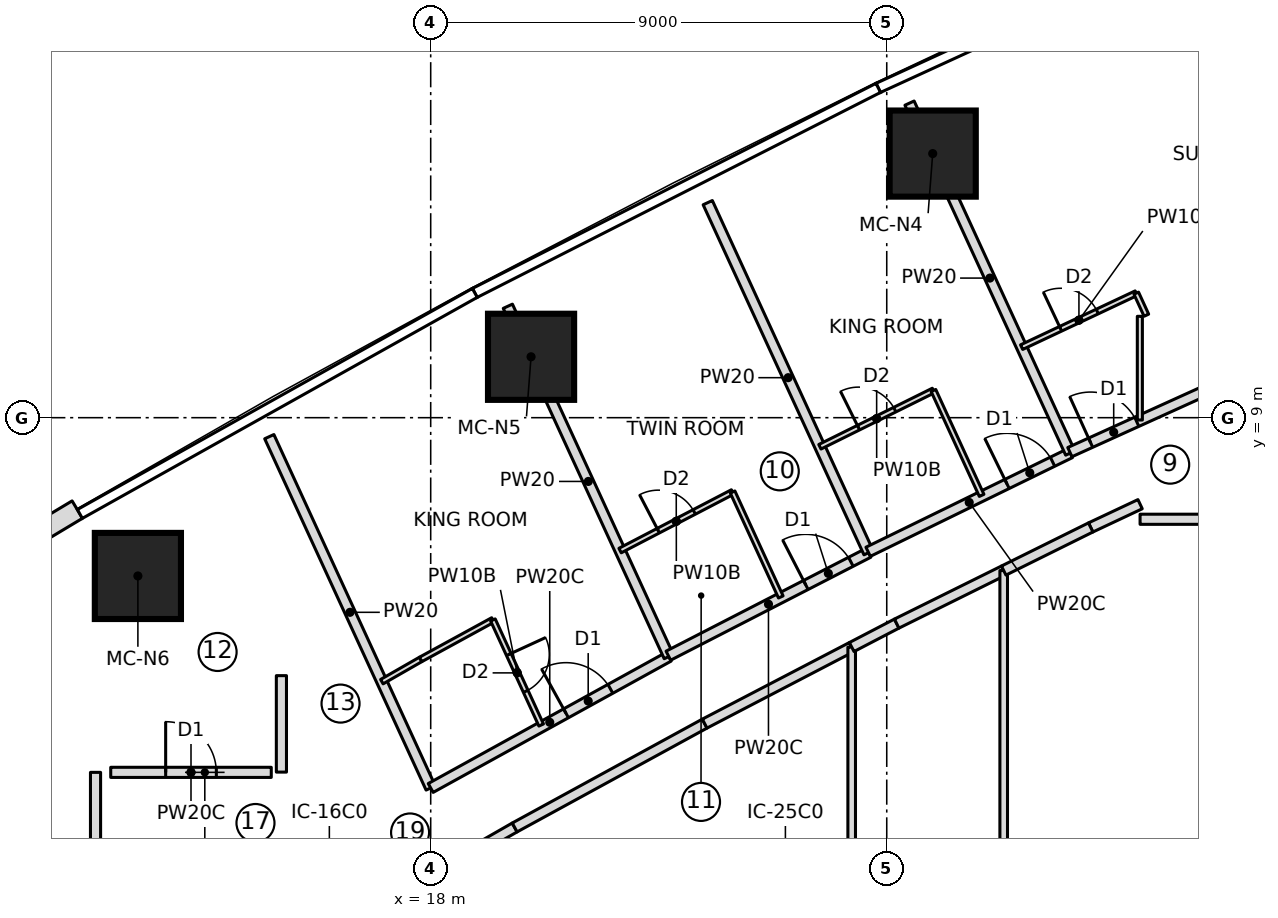
"""IFC4 building model, lengths in metres.
Left out: names, types, materials, properties, quantities, classifications, styles, units other than length and angle.
Written with IfcOpenShell. Run it as: python <this file> out.ifc"""

import sys

from ifc_helpers import new_model, si_unit, direction, frame, frame_2d, origin, origin_2d, place, context, subcontext, project, spatial, polyline, rectangle, outline, extrude, element, fill, save


model = new_model("IFC4")
c1 = context("Model", 3, precision=1e-05, world=origin(), true_north=direction((0.0, 1.0)))
c2 = subcontext(c1, "Body", "Model", "MODEL_VIEW")
j1 = project(units=[si_unit("LENGTHUNIT", "METRE"), si_unit("PLANEANGLEUNIT", "RADIAN")], contexts=[c1])
p1 = place(None, origin())
s1 = spatial("IfcSite", under=j1, at=p1, CompositionType="ELEMENT")
p2 = place(p1, origin())
s2 = spatial("IfcBuilding", under=s1, at=p2, CompositionType="ELEMENT")
p3 = place(p2, frame((0.0, 0.0, 113.3)))
s3 = spatial("IfcBuildingStorey", under=s2, at=p3, CompositionType="ELEMENT", Elevation=113.3)
for number, where, z_axis, x_axis in (
    (1, (27.907, 14.212, 0.0), (0.0, 0.0, 1.0), (1.0, 0.0, 0.0)),
    (2, (19.981, 10.202, 0.0), (0.0, 0.0, 1.0), (1.0, 0.0, 0.0)),
    (3, (12.221, 5.876, 0.0), (0.0, 0.0, 1.0), (1.0, 0.0, 0.0)),
):
    element("IfcColumn", number, at=place(p3, frame(where, z_axis=z_axis, x_axis=x_axis)), inside=s3, PredefinedType="COLUMN", context=c2, shape_type="SweptSolid", body=[
        extrude(rectangle(XDim=1.7, YDim=1.7, at=origin_2d()), origin(), (0.0, 0.0, 1.0), 3.55),
    ])
p4 = place(p3, frame((11.026, 7.186, 0.0), z_axis=(0.0, 0.0, 1.0), x_axis=(-0.857550776474, -0.514399325202, 0.0)))
e4 = element("IfcWall", 4, at=p4, inside=s3, PredefinedType="NOTDEFINED", context=c2, shape_type="SweptSolid", body=[
    extrude(outline(polyline([(0.0, -0.2), (4.503, -0.2), (4.433, 0.2), (0.0, 0.2), (0.0, -0.2)])), origin(), (0.0, 0.0, 1.0), 3.25),
])
p5 = place(p4, frame((1.134, 0.0, 0.6)))
e5 = element("IfcOpeningElement", 5, at=p5, cuts=e4, PredefinedType="OPENING", context=c2, shape_type="SweptSolid", body=[
    extrude(outline(polyline([(0.0, 1.35), (0.084, 1.771), (0.322, 2.128), (0.679, 2.366), (1.1, 2.45), (1.521, 2.366), (1.878, 2.128), (2.116, 1.771), (2.2, 1.35), (2.2, 1.1), (2.116, 0.679), (1.878, 0.322), (1.521, 0.084), (1.1, 0.0), (0.679, 0.084), (0.322, 0.322), (0.084, 0.679), (0.0, 1.1), (0.0, 1.35)])), frame((0.0, 0.21, 0.0), z_axis=(0.0, -1.0, 0.0), x_axis=(1.0, 0.0, 0.0)), (0.0, 0.0, 1.0), 0.42),
])
p6 = place(p3, frame((11.685, 2.0, 0.0), z_axis=(0.0, 0.0, 1.0), x_axis=(1.0, 0.0, 0.0)))
e6 = element("IfcWall", 6, at=p6, inside=s3, PredefinedType="PARTITIONING", context=c2, shape_type="SweptSolid", body=[
    extrude(rectangle(XDim=3.168, YDim=0.2, at=frame_2d((1.584, 0.0))), origin(), (0.0, 0.0, 1.0), 3.25),
])
p7 = place(p6, frame((1.084, 0.0, 0.0)))
e7 = element("IfcOpeningElement", 7, at=p7, cuts=e6, PredefinedType="OPENING", context=c2, shape_type="SweptSolid", body=[
    extrude(rectangle(XDim=1.0, YDim=2.1, at=frame_2d((0.5, 1.05))), frame((0.0, 0.11, 0.0), z_axis=(0.0, -1.0, 0.0), x_axis=(1.0, 0.0, 0.0)), (0.0, 0.0, 1.0), 0.22),
])
p8 = place(p3, frame((11.385, -2.0, 0.0), z_axis=(0.0, 0.0, 1.0), x_axis=(0.0, 1.0, 0.0)))
e8 = element("IfcWall", 8, at=p8, inside=s3, PredefinedType="PARTITIONING", context=c2, shape_type="SweptSolid", body=[
    extrude(rectangle(XDim=4.0, YDim=0.2, at=frame_2d((2.0, 0.0))), origin(), (0.0, 0.0, 1.0), 3.25),
])
p9 = place(p8, frame((0.4, 0.0, 0.0)))
e9 = element("IfcOpeningElement", 9, at=p9, cuts=e8, PredefinedType="OPENING", context=c2, shape_type="SweptSolid", body=[
    extrude(rectangle(XDim=1.0, YDim=2.1, at=frame_2d((0.5, 1.05))), frame((0.0, 0.11, 0.0), z_axis=(0.0, -1.0, 0.0), x_axis=(1.0, 0.0, 0.0)), (0.0, 0.0, 1.0), 0.22),
])
p10 = place(p3, frame((14.815, 8.626, 0.0), z_axis=(0.0, 0.0, 1.0), x_axis=(0.417432341259, -0.908708006166, 0.0)))
e10 = element("IfcWall", 10, at=p10, inside=s3, PredefinedType="PARTITIONING", context=c2, shape_type="SweptSolid", body=[
    extrude(rectangle(XDim=7.631, YDim=0.2, at=frame_2d((3.815, 0.0))), origin(), (0.0, 0.0, 1.0), 3.25),
])
p11 = place(p3, frame((18.0, 1.692, 0.0), z_axis=(0.0, 0.0, 1.0), x_axis=(0.875548487611, 0.483130257634, 0.0)))
e11 = element("IfcWall", 11, at=p11, inside=s3, PredefinedType="PARTITIONING", context=c2, shape_type="SweptSolid", body=[
    extrude(rectangle(XDim=5.367, YDim=0.2, at=frame_2d((2.683, 0.0))), origin(), (0.0, 0.0, 1.0), 3.25),
])
p12 = place(p11, frame((3.05, 0.0, 0.0)))
e12 = element("IfcOpeningElement", 12, at=p12, cuts=e11, PredefinedType="OPENING", context=c2, shape_type="SweptSolid", body=[
    extrude(rectangle(XDim=1.0, YDim=2.1, at=frame_2d((0.5, 1.05))), frame((0.0, 0.11, 0.0), z_axis=(0.0, -1.0, 0.0), x_axis=(1.0, 0.0, 0.0)), (0.0, 0.0, 1.0), 0.22),
])
p13 = place(p3, frame((17.036, 3.79, 0.0), z_axis=(0.0, 0.0, 1.0), x_axis=(0.867629162742, 0.497211862248, 0.0)))
e13 = element("IfcWall", 13, at=p13, inside=s3, PredefinedType="PARTITIONING", context=c2, shape_type="SweptSolid", body=[
    extrude(rectangle(XDim=0.882, YDim=0.1, at=frame_2d((0.441, 0.0))), origin(), (0.0, 0.0, 1.0), 3.25),
])
p14 = place(p3, frame((17.801, 4.229, 0.0), z_axis=(0.0, 0.0, 1.0), x_axis=(0.877424481957, 0.479714788663, 0.0)))
e14 = element("IfcWall", 14, at=p14, inside=s3, PredefinedType="PARTITIONING", context=c2, shape_type="SweptSolid", body=[
    extrude(rectangle(XDim=1.625, YDim=0.1, at=frame_2d((0.813, 0.0))), origin(), (0.0, 0.0, 1.0), 3.25),
])
p15 = place(p3, frame((19.228, 5.008, 0.0), z_axis=(0.0, 0.0, 1.0), x_axis=(0.417450047292, -0.908699872354, 0.0)))
e15 = element("IfcWall", 15, at=p15, inside=s3, PredefinedType="PARTITIONING", context=c2, shape_type="SweptSolid", body=[
    extrude(rectangle(XDim=2.283, YDim=0.1, at=frame_2d((1.141, 0.0))), origin(), (0.0, 0.0, 1.0), 3.25),
])
p16 = place(p15, frame((0.75, 0.0, 0.0)))
e16 = element("IfcOpeningElement", 16, at=p16, cuts=e15, PredefinedType="OPENING", context=c2, shape_type="SweptSolid", body=[
    extrude(rectangle(XDim=0.8, YDim=2.1, at=frame_2d((0.4, 1.05))), frame((0.0, 0.06, 0.0), z_axis=(0.0, -1.0, 0.0), x_axis=(1.0, 0.0, 0.0)), (0.0, 0.0, 1.0), 0.12),
])
p17 = place(p3, frame((22.699, 4.284, 0.0), z_axis=(0.0, 0.0, 1.0), x_axis=(-0.417413534969, 0.908716644959, 0.0)))
e17 = element("IfcWall", 17, at=p17, inside=s3, PredefinedType="PARTITIONING", context=c2, shape_type="SweptSolid", body=[
    extrude(rectangle(XDim=7.609, YDim=0.2, at=frame_2d((3.805, 0.0))), origin(), (0.0, 0.0, 1.0), 3.25),
])
p18 = place(p3, frame((22.69, 4.302, 0.0), z_axis=(0.0, 0.0, 1.0), x_axis=(0.889236075961, 0.457448577667, 0.0)))
e18 = element("IfcWall", 18, at=p18, inside=s3, PredefinedType="PARTITIONING", context=c2, shape_type="SweptSolid", body=[
    extrude(rectangle(XDim=4.443, YDim=0.2, at=frame_2d((2.222, 0.0))), origin(), (0.0, 0.0, 1.0), 3.25),
])
p19 = place(p18, frame((3.05, 0.0, 0.0)))
e19 = element("IfcOpeningElement", 19, at=p19, cuts=e18, PredefinedType="OPENING", context=c2, shape_type="SweptSolid", body=[
    extrude(rectangle(XDim=1.0, YDim=2.1, at=frame_2d((0.5, 1.05))), frame((0.0, 0.11, 0.0), z_axis=(0.0, -1.0, 0.0), x_axis=(1.0, 0.0, 0.0)), (0.0, 0.0, 1.0), 0.22),
])
p20 = place(p3, frame((21.738, 6.377, 0.0), z_axis=(0.0, 0.0, 1.0), x_axis=(0.886911586599, 0.461939214135, 0.0)))
e20 = element("IfcWall", 20, at=p20, inside=s3, PredefinedType="PARTITIONING", context=c2, shape_type="SweptSolid", body=[
    extrude(rectangle(XDim=2.503, YDim=0.1, at=frame_2d((1.251, 0.0))), origin(), (0.0, 0.0, 1.0), 3.25),
])
p21 = place(p20, frame((0.85, 0.0, 0.0)))
e21 = element("IfcOpeningElement", 21, at=p21, cuts=e20, PredefinedType="OPENING", context=c2, shape_type="SweptSolid", body=[
    extrude(rectangle(XDim=0.8, YDim=2.1, at=frame_2d((0.4, 1.05))), frame((0.0, 0.06, 0.0), z_axis=(0.0, -1.0, 0.0), x_axis=(1.0, 0.0, 0.0)), (0.0, 0.0, 1.0), 0.12),
])
p22 = place(p3, frame((23.958, 7.533, 0.0), z_axis=(0.0, 0.0, 1.0), x_axis=(0.417454762401, -0.908697706253, 0.0)))
e22 = element("IfcWall", 22, at=p22, inside=s3, PredefinedType="PARTITIONING", context=c2, shape_type="SweptSolid", body=[
    extrude(rectangle(XDim=2.28, YDim=0.1, at=frame_2d((1.14, 0.0))), origin(), (0.0, 0.0, 1.0), 3.25),
])
p23 = place(p3, frame((26.641, 6.335, 0.0), z_axis=(0.0, 0.0, 1.0), x_axis=(-0.417455028008, 0.908697584233, 0.0)))
e23 = element("IfcWall", 23, at=p23, inside=s3, PredefinedType="PARTITIONING", context=c2, shape_type="SweptSolid", body=[
    extrude(rectangle(XDim=7.603, YDim=0.2, at=frame_2d((3.802, 0.0))), origin(), (0.0, 0.0, 1.0), 3.25),
])
p24 = place(p3, frame((26.633, 6.353, 0.0), z_axis=(0.0, 0.0, 1.0), x_axis=(0.898502457097, 0.438968489291, 0.0)))
e24 = element("IfcWall", 24, at=p24, inside=s3, PredefinedType="PARTITIONING", context=c2, shape_type="SweptSolid", body=[
    extrude(rectangle(XDim=4.44, YDim=0.2, at=frame_2d((2.22, 0.0))), origin(), (0.0, 0.0, 1.0), 3.25),
])
p25 = place(p24, frame((3.05, 0.0, 0.0)))
e25 = element("IfcOpeningElement", 25, at=p25, cuts=e24, PredefinedType="OPENING", context=c2, shape_type="SweptSolid", body=[
    extrude(rectangle(XDim=1.0, YDim=2.1, at=frame_2d((0.5, 1.05))), frame((0.0, 0.11, 0.0), z_axis=(0.0, -1.0, 0.0), x_axis=(1.0, 0.0, 0.0)), (0.0, 0.0, 1.0), 0.22),
])
p26 = place(p3, frame((25.681, 8.426, 0.0), z_axis=(0.0, 0.0, 1.0), x_axis=(0.895944857815, 0.444165297784, 0.0)))
e26 = element("IfcWall", 26, at=p26, inside=s3, PredefinedType="PARTITIONING", context=c2, shape_type="SweptSolid", body=[
    extrude(rectangle(XDim=2.501, YDim=0.1, at=frame_2d((1.25, 0.0))), origin(), (0.0, 0.0, 1.0), 3.25),
])
p27 = place(p26, frame((0.85, 0.0, 0.0)))
e27 = element("IfcOpeningElement", 27, at=p27, cuts=e26, PredefinedType="OPENING", context=c2, shape_type="SweptSolid", body=[
    extrude(rectangle(XDim=0.8, YDim=2.1, at=frame_2d((0.4, 1.05))), frame((0.0, 0.06, 0.0), z_axis=(0.0, -1.0, 0.0), x_axis=(1.0, 0.0, 0.0)), (0.0, 0.0, 1.0), 0.12),
])
p28 = place(p3, frame((27.922, 9.537, 0.0), z_axis=(0.0, 0.0, 1.0), x_axis=(0.417433204355, -0.908707609686, 0.0)))
e28 = element("IfcWall", 28, at=p28, inside=s3, PredefinedType="PARTITIONING", context=c2, shape_type="SweptSolid", body=[
    extrude(rectangle(XDim=2.278, YDim=0.1, at=frame_2d((1.139, 0.0))), origin(), (0.0, 0.0, 1.0), 3.25),
])
p29 = place(p3, frame((30.622, 8.302, 0.0), z_axis=(0.0, 0.0, 1.0), x_axis=(-0.417429919618, 0.90870911859, 0.0)))
e29 = element("IfcWall", 29, at=p29, inside=s3, PredefinedType="PARTITIONING", context=c2, shape_type="SweptSolid", body=[
    extrude(rectangle(XDim=7.6, YDim=0.2, at=frame_2d((3.8, 0.0))), origin(), (0.0, 0.0, 1.0), 3.25),
])
p30 = place(p3, frame((30.614, 8.32, 0.0), z_axis=(0.0, 0.0, 1.0), x_axis=(0.910751030363, 0.41295588226, 0.0)))
e30 = element("IfcWall", 30, at=p30, inside=s3, PredefinedType="PARTITIONING", context=c2, shape_type="SweptSolid", body=[
    extrude(rectangle(XDim=8.883, YDim=0.2, at=frame_2d((4.442, 0.0))), origin(), (0.0, 0.0, 1.0), 3.25),
])
p31 = place(p30, frame((0.45, 0.0, 0.0)))
e31 = element("IfcOpeningElement", 31, at=p31, cuts=e30, PredefinedType="OPENING", context=c2, shape_type="SweptSolid", body=[
    extrude(rectangle(XDim=1.0, YDim=2.1, at=frame_2d((0.5, 1.05))), frame((0.0, 0.11, 0.0), z_axis=(0.0, -1.0, 0.0), x_axis=(1.0, 0.0, 0.0)), (0.0, 0.0, 1.0), 0.22),
])
p32 = place(p3, frame((29.662, 10.392, 0.0), z_axis=(0.0, 0.0, 1.0), x_axis=(0.904688082375, 0.426074493027, 0.0)))
e32 = element("IfcWall", 32, at=p32, inside=s3, PredefinedType="PARTITIONING", context=c2, shape_type="SweptSolid", body=[
    extrude(rectangle(XDim=2.5, YDim=0.1, at=frame_2d((1.25, 0.0))), origin(), (0.0, 0.0, 1.0), 3.25),
])
p33 = place(p32, frame((0.85, 0.0, 0.0)))
e33 = element("IfcOpeningElement", 33, at=p33, cuts=e32, PredefinedType="OPENING", context=c2, shape_type="SweptSolid", body=[
    extrude(rectangle(XDim=0.8, YDim=2.1, at=frame_2d((0.4, 1.05))), frame((0.0, 0.06, 0.0), z_axis=(0.0, -1.0, 0.0), x_axis=(1.0, 0.0, 0.0)), (0.0, 0.0, 1.0), 0.12),
])
p34 = place(p3, frame((31.924, 11.457, 0.0), z_axis=(0.0, 0.0, 1.0), x_axis=(0.4176025781, -0.908629785316, 0.0)))
e34 = element("IfcWall", 34, at=p34, inside=s3, PredefinedType="PARTITIONING", context=c2, shape_type="SweptSolid", body=[
    extrude(rectangle(XDim=0.479, YDim=0.1, at=frame_2d((0.239, 0.0))), origin(), (0.0, 0.0, 1.0), 3.25),
])
p35 = place(p3, frame((18.065, 0.0, 0.0), z_axis=(0.0, 0.0, 1.0), x_axis=(0.867694156962, 0.49709843087, 0.0)))
e35 = element("IfcWall", 35, at=p35, inside=s3, PredefinedType="PARTITIONING", context=c2, shape_type="SweptSolid", body=[
    extrude(rectangle(XDim=1.835, YDim=0.2, at=frame_2d((0.918, 0.0))), origin(), (0.0, 0.0, 1.0), 3.25),
])
p36 = place(p3, frame((19.657, 0.912, 0.0), z_axis=(0.0, 0.0, 1.0), x_axis=(0.877465075585, 0.479640533242, 0.0)))
e36 = element("IfcWall", 36, at=p36, inside=s3, PredefinedType="PARTITIONING", context=c2, shape_type="SweptSolid", body=[
    extrude(rectangle(XDim=4.273, YDim=0.2, at=frame_2d((2.137, 0.0))), origin(), (0.0, 0.0, 1.0), 3.25),
])
p37 = place(p3, frame((23.407, 2.962, 0.0), z_axis=(0.0, 0.0, 1.0), x_axis=(0.886901344009, 0.461958879116, 0.0)))
e37 = element("IfcWall", 37, at=p37, inside=s3, PredefinedType="PARTITIONING", context=c2, shape_type="SweptSolid", body=[
    extrude(rectangle(XDim=3.271, YDim=0.2, at=frame_2d((1.636, 0.0))), origin(), (0.0, 0.0, 1.0), 3.25),
])
p38 = place(p3, frame((26.308, -4.473, 0.0), z_axis=(0.0, 0.0, 1.0), x_axis=(0.0, 1.0, 0.0)))
e38 = element("IfcWall", 38, at=p38, inside=s3, PredefinedType="PARTITIONING", context=c2, shape_type="SweptSolid", body=[
    extrude(rectangle(XDim=8.946, YDim=0.15, at=frame_2d((4.473, 0.0))), origin(), (0.0, 0.0, 1.0), 3.25),
])
p39 = place(p3, frame((26.308, 4.473, 0.0), z_axis=(0.0, 0.0, 1.0), x_axis=(0.886893275317, 0.461974369633, 0.0)))
e39 = element("IfcWall", 39, at=p39, inside=s3, PredefinedType="PARTITIONING", context=c2, shape_type="SweptSolid", body=[
    extrude(rectangle(XDim=1.001, YDim=0.2, at=frame_2d((0.501, 0.0))), origin(), (0.0, 0.0, 1.0), 3.25),
])
p40 = place(p3, frame((27.196, 4.936, 0.0), z_axis=(0.0, 0.0, 1.0), x_axis=(0.895954899574, 0.444145041546, 0.0)))
e40 = element("IfcWall", 40, at=p40, inside=s3, PredefinedType="PARTITIONING", context=c2, shape_type="SweptSolid", body=[
    extrude(rectangle(XDim=2.357, YDim=0.2, at=frame_2d((1.179, 0.0))), origin(), (0.0, 0.0, 1.0), 3.25),
])
p41 = place(p3, frame((29.308, -5.983, 0.0), z_axis=(0.0, 0.0, 1.0), x_axis=(0.0, 1.0, 0.0)))
e41 = element("IfcWall", 41, at=p41, inside=s3, PredefinedType="PARTITIONING", context=c2, shape_type="SweptSolid", body=[
    extrude(rectangle(XDim=11.965, YDim=0.15, at=frame_2d((5.983, 0.0))), origin(), (0.0, 0.0, 1.0), 3.25),
])
p42 = place(p3, frame((31.025, 6.833, 0.0), z_axis=(0.0, 0.0, 1.0), x_axis=(0.904690325494, 0.426069730159, 0.0)))
e42 = element("IfcWall", 42, at=p42, inside=s3, PredefinedType="PARTITIONING", context=c2, shape_type="SweptSolid", body=[
    extrude(rectangle(XDim=1.078, YDim=0.2, at=frame_2d((0.539, 0.0))), origin(), (0.0, 0.0, 1.0), 3.25),
])
p43 = place(p3, frame((29.308, 5.983, 0.0), z_axis=(0.0, 0.0, 1.0), x_axis=(0.896001589052, 0.444050844404, 0.0)))
e43 = element("IfcWall", 43, at=p43, inside=s3, PredefinedType="PARTITIONING", context=c2, shape_type="SweptSolid", body=[
    extrude(rectangle(XDim=1.916, YDim=0.2, at=frame_2d((0.958, 0.0))), origin(), (0.0, 0.0, 1.0), 3.25),
])
p44 = place(p3, frame((31.995, 11.0, 0.0), z_axis=(0.0, 0.0, 1.0), x_axis=(0.0, -1.0, 0.0)))
e44 = element("IfcWall", 44, at=p44, inside=s3, PredefinedType="PARTITIONING", context=c2, shape_type="SweptSolid", body=[
    extrude(rectangle(XDim=2.046, YDim=0.1, at=frame_2d((1.023, 0.0))), origin(), (0.0, 0.0, 1.0), 3.25),
])
p45 = place(p3, frame((32.0, 6.995, 0.0), z_axis=(0.0, 0.0, 1.0), x_axis=(0.99999999256, 0.00012198097, 0.0)))
e45 = element("IfcWall", 45, at=p45, inside=s3, PredefinedType="PARTITIONING", context=c2, shape_type="SweptSolid", body=[
    extrude(rectangle(XDim=4.003, YDim=0.2, at=frame_2d((2.001, 0.0))), origin(), (0.0, 0.0, 1.0), 3.25),
])
p46 = place(p3, frame((15.054, 3.909, 0.0), z_axis=(0.0, 0.0, 1.0), x_axis=(0.0, -1.0, 0.0)))
e46 = element("IfcWall", 46, at=p46, inside=s3, PredefinedType="PARTITIONING", context=c2, shape_type="SweptSolid", body=[
    extrude(rectangle(XDim=1.904, YDim=0.2, at=frame_2d((0.952, 0.0))), origin(), (0.0, 0.0, 1.0), 3.25),
])
p47 = place(p7, origin())
e47 = element("IfcDoor", 47, at=p47, inside=s3, OperationType="SINGLE_SWING_LEFT", PredefinedType="DOOR", context=c2, shape_type="SweptSolid", body=[
    extrude(rectangle(XDim=1.0, YDim=2.1, at=frame_2d((0.5, 1.05))), frame((0.0, 0.025, 0.0), z_axis=(0.0, -1.0, 0.0), x_axis=(1.0, 0.0, 0.0)), (0.0, 0.0, 1.0), 0.05),
])
fill(e7, e47)
p48 = place(p16, origin())
e48 = element("IfcDoor", 48, at=p48, inside=s3, OperationType="SINGLE_SWING_LEFT", PredefinedType="DOOR", context=c2, shape_type="SweptSolid", body=[
    extrude(rectangle(XDim=0.8, YDim=2.1, at=frame_2d((0.4, 1.05))), frame((0.0, 0.025, 0.0), z_axis=(0.0, -1.0, 0.0), x_axis=(1.0, 0.0, 0.0)), (0.0, 0.0, 1.0), 0.05),
])
fill(e16, e48)
p49 = place(p12, origin())
e49 = element("IfcDoor", 49, at=p49, inside=s3, OperationType="SINGLE_SWING_LEFT", PredefinedType="DOOR", context=c2, shape_type="SweptSolid", body=[
    extrude(rectangle(XDim=1.0, YDim=2.1, at=frame_2d((0.5, 1.05))), frame((0.0, 0.025, 0.0), z_axis=(0.0, -1.0, 0.0), x_axis=(1.0, 0.0, 0.0)), (0.0, 0.0, 1.0), 0.05),
])
fill(e12, e49)
p50 = place(p21, origin())
e50 = element("IfcDoor", 50, at=p50, inside=s3, OperationType="SINGLE_SWING_LEFT", PredefinedType="DOOR", context=c2, shape_type="SweptSolid", body=[
    extrude(rectangle(XDim=0.8, YDim=2.1, at=frame_2d((0.4, 1.05))), frame((0.0, 0.025, 0.0), z_axis=(0.0, -1.0, 0.0), x_axis=(1.0, 0.0, 0.0)), (0.0, 0.0, 1.0), 0.05),
])
fill(e21, e50)
p51 = place(p19, origin())
e51 = element("IfcDoor", 51, at=p51, inside=s3, OperationType="SINGLE_SWING_LEFT", PredefinedType="DOOR", context=c2, shape_type="SweptSolid", body=[
    extrude(rectangle(XDim=1.0, YDim=2.1, at=frame_2d((0.5, 1.05))), frame((0.0, 0.025, 0.0), z_axis=(0.0, -1.0, 0.0), x_axis=(1.0, 0.0, 0.0)), (0.0, 0.0, 1.0), 0.05),
])
fill(e19, e51)
p52 = place(p27, origin())
e52 = element("IfcDoor", 52, at=p52, inside=s3, OperationType="SINGLE_SWING_LEFT", PredefinedType="DOOR", context=c2, shape_type="SweptSolid", body=[
    extrude(rectangle(XDim=0.8, YDim=2.1, at=frame_2d((0.4, 1.05))), frame((0.0, 0.025, 0.0), z_axis=(0.0, -1.0, 0.0), x_axis=(1.0, 0.0, 0.0)), (0.0, 0.0, 1.0), 0.05),
])
fill(e27, e52)
p53 = place(p25, origin())
e53 = element("IfcDoor", 53, at=p53, inside=s3, OperationType="SINGLE_SWING_LEFT", PredefinedType="DOOR", context=c2, shape_type="SweptSolid", body=[
    extrude(rectangle(XDim=1.0, YDim=2.1, at=frame_2d((0.5, 1.05))), frame((0.0, 0.025, 0.0), z_axis=(0.0, -1.0, 0.0), x_axis=(1.0, 0.0, 0.0)), (0.0, 0.0, 1.0), 0.05),
])
fill(e25, e53)
p54 = place(p33, origin())
e54 = element("IfcDoor", 54, at=p54, inside=s3, OperationType="SINGLE_SWING_LEFT", PredefinedType="DOOR", context=c2, shape_type="SweptSolid", body=[
    extrude(rectangle(XDim=0.8, YDim=2.1, at=frame_2d((0.4, 1.05))), frame((0.0, 0.025, 0.0), z_axis=(0.0, -1.0, 0.0), x_axis=(1.0, 0.0, 0.0)), (0.0, 0.0, 1.0), 0.05),
])
fill(e33, e54)
p55 = place(p31, origin())
e55 = element("IfcDoor", 55, at=p55, inside=s3, OperationType="SINGLE_SWING_LEFT", PredefinedType="DOOR", context=c2, shape_type="SweptSolid", body=[
    extrude(rectangle(XDim=1.0, YDim=2.1, at=frame_2d((0.5, 1.05))), frame((0.0, 0.025, 0.0), z_axis=(0.0, -1.0, 0.0), x_axis=(1.0, 0.0, 0.0)), (0.0, 0.0, 1.0), 0.05),
])
fill(e31, e55)
save(model, sys.argv[1])
